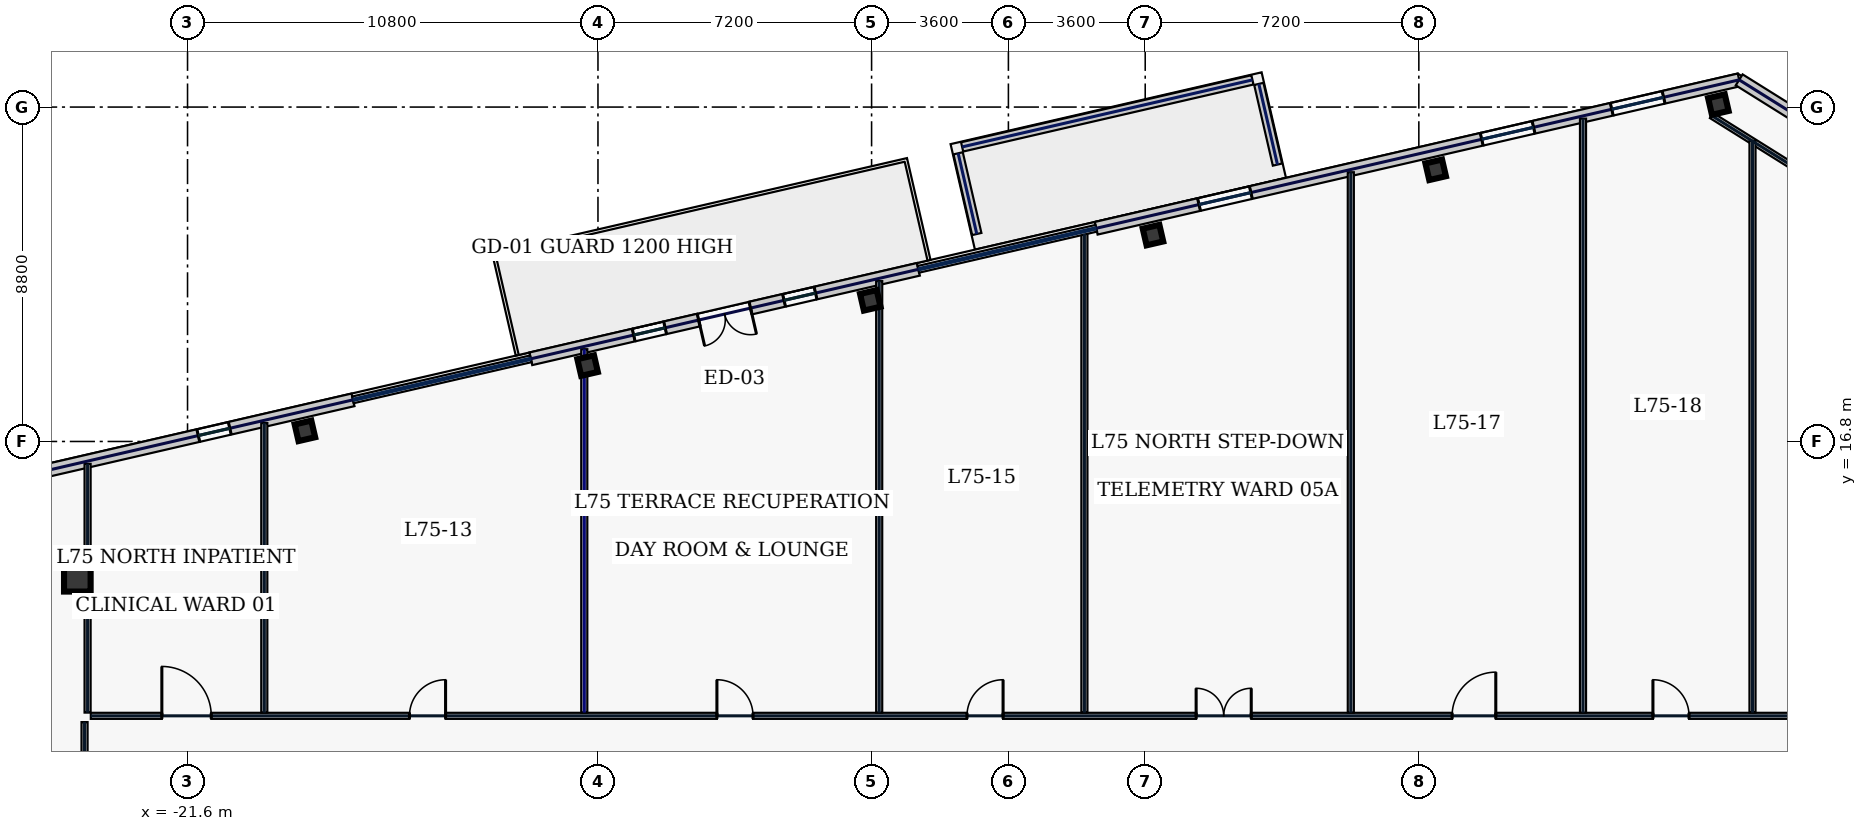
"""IFC4 building model, lengths in metres.
Left out: names, types, materials, properties, quantities, classifications, styles, units other than length and angle.
Written with IfcOpenShell. Run it as: python <this file> out.ifc"""

import sys

from ifc_helpers import new_model, si_unit, direction, frame, frame_2d, origin, origin_2d, place, context, subcontext, project, spatial, rectangle, hollow_rectangle, extrude, element, fill, save


model = new_model("IFC4")
c1 = context("Model", 3, precision=1e-05, world=origin(), true_north=direction((0.0, 1.0)))
c2 = subcontext(c1, "Body", "Model", "MODEL_VIEW")
j1 = project(units=[si_unit("LENGTHUNIT", "METRE"), si_unit("PLANEANGLEUNIT", "RADIAN")], contexts=[c1])
p1 = place(None, origin())
s1 = spatial("IfcSite", under=j1, at=p1, CompositionType="ELEMENT")
p2 = place(p1, origin())
s2 = spatial("IfcBuilding", under=s1, at=p2, CompositionType="ELEMENT")
p3 = place(p2, frame((0.0, 0.0, 321.0)))
s3 = spatial("IfcBuildingStorey", under=s2, at=p3, CompositionType="ELEMENT", Elevation=321.0)
p4 = place(p3, frame((-24.5, 13.2, 0.0), z_axis=(0.0, 0.0, 1.0), x_axis=(1.0, 0.0, 0.0)))
e1 = element("IfcColumn", 1, at=p4, inside=s3, PredefinedType="COLUMN", context=c2, shape_type="SweptSolid", body=[
    extrude(hollow_rectangle(XDim=0.7, YDim=0.7, WallThickness=0.032, at=origin_2d()), origin(), (0.0, 0.0, 1.0), 3.74),
])
for number, where, z_axis, x_axis in (
    (2, (18.682, 25.666, 0.0), (0.0, 0.0, 1.0), (0.974, 0.225, 0.0)),
    (3, (11.243, 23.949, 0.0), (0.0, 0.0, 1.0), (0.974, 0.225, 0.0)),
    (4, (3.804, 22.232, 0.0), (0.0, 0.0, 1.0), (0.974, 0.225, 0.0)),
    (5, (-3.634, 20.514, 0.0), (0.0, 0.0, 1.0), (0.974, 0.225, 0.0)),
    (6, (-11.073, 18.797, 0.0), (0.0, 0.0, 1.0), (0.974, 0.225, 0.0)),
    (7, (-18.511, 17.08, 0.0), (0.0, 0.0, 1.0), (0.974, 0.225, 0.0)),
):
    element("IfcColumn", number, at=place(p3, frame(where, z_axis=z_axis, x_axis=x_axis)), inside=s3, PredefinedType="COLUMN", context=c2, shape_type="SweptSolid", body=[
        extrude(hollow_rectangle(XDim=0.45, YDim=0.45, WallThickness=0.022, at=origin_2d()), origin(), (0.0, 0.0, 1.0), 3.74),
    ])
p5 = place(p3, frame((-0.832, 22.26, 0.0), z_axis=(0.0, 0.0, 1.0), x_axis=(-0.224998554752, 0.974359097232, 0.0)))
e8 = element("IfcWall", 8, at=p5, inside=s3, PredefinedType="PARAPET", context=c2, shape_type="SweptSolid", body=[
    extrude(rectangle(XDim=2.18, YDim=0.25, at=frame_2d((1.09, 0.0))), origin(), (0.0, 0.0, 1.0), 1.15),
])
p6 = place(p3, frame((-1.218, 24.552, 0.0), z_axis=(0.0, 0.0, 1.0), x_axis=(0.974375973266, 0.224925460368, 0.0)))
e9 = element("IfcWall", 9, at=p6, inside=s3, PredefinedType="PARAPET", context=c2, shape_type="SweptSolid", body=[
    extrude(rectangle(XDim=7.84, YDim=0.25, at=frame_2d((3.92, 0.0))), origin(), (0.0, 0.0, 1.0), 1.15),
])
p7 = place(p3, frame((6.59, 26.21, 0.0), z_axis=(0.0, 0.0, 1.0), x_axis=(0.224867685436, -0.974389308258, 0.0)))
e10 = element("IfcWall", 10, at=p7, inside=s3, PredefinedType="PARAPET", context=c2, shape_type="SweptSolid", body=[
    extrude(rectangle(XDim=2.18, YDim=0.25, at=frame_2d((1.09, 0.0))), origin(), (0.0, 0.0, 1.0), 1.15),
])
p8 = place(p3, frame((19.229, 26.316, 0.0), z_axis=(0.0, 0.0, 1.0), x_axis=(-0.974372473594, -0.224940620392, 0.0)))
e11 = element("IfcWall", 11, at=p8, inside=s3, PredefinedType="STANDARD", context=c2, shape_type="SweptSolid", body=[
    extrude(rectangle(XDim=17.366, YDim=0.34, at=frame_2d((8.683, 0.0))), origin(), (0.0, 0.0, 1.0), 3.74),
])
p9 = place(p8, frame((13.187, 0.0, 1.0)))
e12 = element("IfcOpeningElement", 12, at=p9, cuts=e11, PredefinedType="OPENING", context=c2, shape_type="SweptSolid", body=[
    extrude(rectangle(XDim=1.4, YDim=1.85, at=frame_2d((0.7, 0.925))), frame((0.0, 0.18, 0.0), z_axis=(0.0, -1.0, 0.0), x_axis=(1.0, 0.0, 0.0)), (0.0, 0.0, 1.0), 0.36),
])
p10 = place(p8, frame((5.553, 0.0, 1.0)))
e13 = element("IfcOpeningElement", 13, at=p10, cuts=e11, PredefinedType="OPENING", context=c2, shape_type="SweptSolid", body=[
    extrude(rectangle(XDim=1.4, YDim=1.85, at=frame_2d((0.7, 0.925))), frame((0.0, 0.18, 0.0), z_axis=(0.0, -1.0, 0.0), x_axis=(1.0, 0.0, 0.0)), (0.0, 0.0, 1.0), 0.36),
])
p11 = place(p8, frame((2.041, 0.0, 1.0)))
e14 = element("IfcOpeningElement", 14, at=p11, cuts=e11, PredefinedType="OPENING", context=c2, shape_type="SweptSolid", body=[
    extrude(rectangle(XDim=1.4, YDim=1.85, at=frame_2d((0.7, 0.925))), frame((0.0, 0.18, 0.0), z_axis=(0.0, -1.0, 0.0), x_axis=(1.0, 0.0, 0.0)), (0.0, 0.0, 1.0), 0.36),
])
p12 = place(p3, frame((-2.368, 21.33, 0.0), z_axis=(0.0, 0.0, 1.0), x_axis=(-0.974367213107, -0.224963405961, 0.0)))
e15 = element("IfcWall", 15, at=p12, inside=s3, PredefinedType="STANDARD", context=c2, shape_type="SweptSolid", body=[
    extrude(rectangle(XDim=10.468, YDim=0.34, at=frame_2d((5.234, 0.0))), origin(), (0.0, 0.0, 1.0), 3.74),
])
p13 = place(p12, frame((4.534, 0.0, 0.0)))
e16 = element("IfcOpeningElement", 16, at=p13, cuts=e15, PredefinedType="OPENING", context=c2, shape_type="SweptSolid", body=[
    extrude(rectangle(XDim=1.4, YDim=2.2, at=frame_2d((0.7, 1.1))), frame((0.0, 0.18, 0.0), z_axis=(0.0, -1.0, 0.0), x_axis=(1.0, 0.0, 0.0)), (0.0, 0.0, 1.0), 0.36),
])
p14 = place(p12, frame((6.84, 0.0, 1.0)))
e17 = element("IfcOpeningElement", 17, at=p14, cuts=e15, PredefinedType="OPENING", context=c2, shape_type="SweptSolid", body=[
    extrude(rectangle(XDim=0.85, YDim=1.85, at=frame_2d((0.425, 0.925))), frame((0.0, 0.18, 0.0), z_axis=(0.0, -1.0, 0.0), x_axis=(1.0, 0.0, 0.0)), (0.0, 0.0, 1.0), 0.36),
])
p15 = place(p12, frame((2.778, 0.0, 1.0)))
e18 = element("IfcOpeningElement", 18, at=p15, cuts=e15, PredefinedType="OPENING", context=c2, shape_type="SweptSolid", body=[
    extrude(rectangle(XDim=0.85, YDim=1.85, at=frame_2d((0.425, 0.925))), frame((0.0, 0.18, 0.0), z_axis=(0.0, -1.0, 0.0), x_axis=(1.0, 0.0, 0.0)), (0.0, 0.0, 1.0), 0.36),
])
p16 = place(p3, frame((-17.245, 17.895, 0.0), z_axis=(0.0, 0.0, 1.0), x_axis=(-0.97437318493, -0.224937539085, 0.0)))
e19 = element("IfcWall", 19, at=p16, inside=s3, PredefinedType="STANDARD", context=c2, shape_type="SweptSolid", body=[
    extrude(rectangle(XDim=17.366, YDim=0.34, at=frame_2d((8.683, 0.0))), origin(), (0.0, 0.0, 1.0), 3.74),
])
p17 = place(p16, frame((13.925, 0.0, 1.0)))
e20 = element("IfcOpeningElement", 20, at=p17, cuts=e19, PredefinedType="OPENING", context=c2, shape_type="SweptSolid", body=[
    extrude(rectangle(XDim=1.4, YDim=1.85, at=frame_2d((0.7, 0.925))), frame((0.0, 0.18, 0.0), z_axis=(0.0, -1.0, 0.0), x_axis=(1.0, 0.0, 0.0)), (0.0, 0.0, 1.0), 0.36),
])
p18 = place(p16, frame((10.413, 0.0, 1.0)))
e21 = element("IfcOpeningElement", 21, at=p18, cuts=e19, PredefinedType="OPENING", context=c2, shape_type="SweptSolid", body=[
    extrude(rectangle(XDim=1.4, YDim=1.85, at=frame_2d((0.7, 0.925))), frame((0.0, 0.18, 0.0), z_axis=(0.0, -1.0, 0.0), x_axis=(1.0, 0.0, 0.0)), (0.0, 0.0, 1.0), 0.36),
])
p19 = place(p16, frame((3.329, 0.0, 1.0)))
e22 = element("IfcOpeningElement", 22, at=p19, cuts=e19, PredefinedType="OPENING", context=c2, shape_type="SweptSolid", body=[
    extrude(rectangle(XDim=0.85, YDim=1.85, at=frame_2d((0.425, 0.925))), frame((0.0, 0.18, 0.0), z_axis=(0.0, -1.0, 0.0), x_axis=(1.0, 0.0, 0.0)), (0.0, 0.0, 1.0), 0.36),
])
p20 = place(p3, frame((24.542, 22.996, 0.0), z_axis=(0.0, 0.0, 1.0), x_axis=(-0.848055220921, 0.529907862057, 0.0)))
e23 = element("IfcWall", 23, at=p20, inside=s3, PredefinedType="STANDARD", context=c2, shape_type="SweptSolid", body=[
    extrude(rectangle(XDim=6.265, YDim=0.34, at=frame_2d((3.132, 0.0))), origin(), (0.0, 0.0, 1.0), 3.74),
])
p21 = place(p3, frame((24.018, 21.931, 0.0), z_axis=(0.0, 0.0, 1.0), x_axis=(-0.848051009591, 0.529914601736, 0.0)))
e24 = element("IfcWall", 24, at=p21, inside=s3, PredefinedType="PARTITIONING", context=c2, shape_type="SweptSolid", body=[
    extrude(rectangle(XDim=6.505, YDim=0.16, at=frame_2d((3.253, 0.0))), origin(), (0.0, 0.0, 1.0), 3.74),
])
p22 = place(p3, frame((-24.31, -9.215, 0.0), z_axis=(0.0, 0.0, 1.0), x_axis=(0.0, 1.0, 0.0)))
e25 = element("IfcWall", 25, at=p22, inside=s3, PredefinedType="PARTITIONING", context=c2, shape_type="SweptSolid", body=[
    extrude(rectangle(XDim=18.63, YDim=0.16, at=frame_2d((9.315, 0.0))), origin(), (0.0, 0.0, 1.0), 3.74),
])
p23 = place(p22, frame((1.769, 0.0, 0.0)))
e26 = element("IfcOpeningElement", 26, at=p23, cuts=e25, PredefinedType="OPENING", context=c2, shape_type="SweptSolid", body=[
    extrude(rectangle(XDim=0.95, YDim=2.2, at=frame_2d((0.475, 1.1))), frame((0.0, 0.09, 0.0), z_axis=(0.0, -1.0, 0.0), x_axis=(1.0, 0.0, 0.0)), (0.0, 0.0, 1.0), 0.18),
])
p24 = place(p22, frame((5.6, 0.0, 0.0)))
e27 = element("IfcOpeningElement", 27, at=p24, cuts=e25, PredefinedType="OPENING", context=c2, shape_type="SweptSolid", body=[
    extrude(rectangle(XDim=0.95, YDim=2.2, at=frame_2d((0.475, 1.1))), frame((0.0, 0.09, 0.0), z_axis=(0.0, -1.0, 0.0), x_axis=(1.0, 0.0, 0.0)), (0.0, 0.0, 1.0), 0.18),
])
p25 = place(p22, frame((10.8, 0.0, 0.0)))
e28 = element("IfcOpeningElement", 28, at=p25, cuts=e25, PredefinedType="OPENING", context=c2, shape_type="SweptSolid", body=[
    extrude(rectangle(XDim=0.95, YDim=2.2, at=frame_2d((0.475, 1.1))), frame((0.0, 0.09, 0.0), z_axis=(0.0, -1.0, 0.0), x_axis=(1.0, 0.0, 0.0)), (0.0, 0.0, 1.0), 0.18),
])
p26 = place(p22, frame((15.981, 0.0, 0.0)))
e29 = element("IfcOpeningElement", 29, at=p26, cuts=e25, PredefinedType="OPENING", context=c2, shape_type="SweptSolid", body=[
    extrude(rectangle(XDim=0.95, YDim=2.2, at=frame_2d((0.475, 1.1))), frame((0.0, 0.09, 0.0), z_axis=(0.0, -1.0, 0.0), x_axis=(1.0, 0.0, 0.0)), (0.0, 0.0, 1.0), 0.18),
])
p27 = place(p3, frame((-24.145, 9.58, 0.0), z_axis=(0.0, 0.0, 1.0), x_axis=(1.0, 0.0, 0.0)))
e30 = element("IfcWall", 30, at=p27, inside=s3, PredefinedType="PARTITIONING", context=c2, shape_type="SweptSolid", body=[
    extrude(rectangle(XDim=48.29, YDim=0.16, at=frame_2d((24.145, 0.0))), origin(), (0.0, 0.0, 1.0), 3.74),
])
p28 = place(p27, frame((1.869, 0.0, 0.0)))
e31 = element("IfcOpeningElement", 31, at=p28, cuts=e30, PredefinedType="OPENING", context=c2, shape_type="SweptSolid", body=[
    extrude(rectangle(XDim=1.3, YDim=2.2, at=frame_2d((0.65, 1.1))), frame((0.0, 0.09, 0.0), z_axis=(0.0, -1.0, 0.0), x_axis=(1.0, 0.0, 0.0)), (0.0, 0.0, 1.0), 0.18),
])
p29 = place(p27, frame((8.385, 0.0, 0.0)))
e32 = element("IfcOpeningElement", 32, at=p29, cuts=e30, PredefinedType="OPENING", context=c2, shape_type="SweptSolid", body=[
    extrude(rectangle(XDim=0.95, YDim=2.2, at=frame_2d((0.475, 1.1))), frame((0.0, 0.09, 0.0), z_axis=(0.0, -1.0, 0.0), x_axis=(1.0, 0.0, 0.0)), (0.0, 0.0, 1.0), 0.18),
])
p30 = place(p27, frame((16.475, 0.0, 0.0)))
e33 = element("IfcOpeningElement", 33, at=p30, cuts=e30, PredefinedType="OPENING", context=c2, shape_type="SweptSolid", body=[
    extrude(rectangle(XDim=0.95, YDim=2.2, at=frame_2d((0.475, 1.1))), frame((0.0, 0.09, 0.0), z_axis=(0.0, -1.0, 0.0), x_axis=(1.0, 0.0, 0.0)), (0.0, 0.0, 1.0), 0.18),
])
p31 = place(p27, frame((23.055, 0.0, 0.0)))
e34 = element("IfcOpeningElement", 34, at=p31, cuts=e30, PredefinedType="OPENING", context=c2, shape_type="SweptSolid", body=[
    extrude(rectangle(XDim=0.95, YDim=2.2, at=frame_2d((0.475, 1.1))), frame((0.0, 0.09, 0.0), z_axis=(0.0, -1.0, 0.0), x_axis=(1.0, 0.0, 0.0)), (0.0, 0.0, 1.0), 0.18),
])
p32 = place(p27, frame((29.085, 0.0, 0.0)))
e35 = element("IfcOpeningElement", 35, at=p32, cuts=e30, PredefinedType="OPENING", context=c2, shape_type="SweptSolid", body=[
    extrude(rectangle(XDim=1.45, YDim=2.2, at=frame_2d((0.725, 1.1))), frame((0.0, 0.09, 0.0), z_axis=(0.0, -1.0, 0.0), x_axis=(1.0, 0.0, 0.0)), (0.0, 0.0, 1.0), 0.18),
])
p33 = place(p27, frame((35.82, 0.0, 0.0)))
e36 = element("IfcOpeningElement", 36, at=p33, cuts=e30, PredefinedType="OPENING", context=c2, shape_type="SweptSolid", body=[
    extrude(rectangle(XDim=1.15, YDim=2.2, at=frame_2d((0.575, 1.1))), frame((0.0, 0.09, 0.0), z_axis=(0.0, -1.0, 0.0), x_axis=(1.0, 0.0, 0.0)), (0.0, 0.0, 1.0), 0.18),
])
p34 = place(p27, frame((41.105, 0.0, 0.0)))
e37 = element("IfcOpeningElement", 37, at=p34, cuts=e30, PredefinedType="OPENING", context=c2, shape_type="SweptSolid", body=[
    extrude(rectangle(XDim=0.95, YDim=2.2, at=frame_2d((0.475, 1.1))), frame((0.0, 0.09, 0.0), z_axis=(0.0, -1.0, 0.0), x_axis=(1.0, 0.0, 0.0)), (0.0, 0.0, 1.0), 0.18),
])
p35 = place(p27, frame((45.466, 0.0, 0.0)))
e38 = element("IfcOpeningElement", 38, at=p35, cuts=e30, PredefinedType="OPENING", context=c2, shape_type="SweptSolid", body=[
    extrude(rectangle(XDim=0.95, YDim=2.2, at=frame_2d((0.475, 1.1))), frame((0.0, 0.09, 0.0), z_axis=(0.0, -1.0, 0.0), x_axis=(1.0, 0.0, 0.0)), (0.0, 0.0, 1.0), 0.18),
])
p36 = place(p3, frame((-24.23, 9.665, 0.0), z_axis=(0.0, 0.0, 1.0), x_axis=(0.0, 1.0, 0.0)))
e39 = element("IfcWall", 39, at=p36, inside=s3, PredefinedType="PARTITIONING", context=c2, shape_type="SweptSolid", body=[
    extrude(rectangle(XDim=6.546, YDim=0.16, at=frame_2d((3.273, 0.0))), origin(), (0.0, 0.0, 1.0), 3.74),
])
p37 = place(p3, frame((-19.58, 9.665, 0.0), z_axis=(0.0, 0.0, 1.0), x_axis=(0.0, 1.0, 0.0)))
e40 = element("IfcWall", 40, at=p37, inside=s3, PredefinedType="PARTITIONING", context=c2, shape_type="SweptSolid", body=[
    extrude(rectangle(XDim=7.619, YDim=0.16, at=frame_2d((3.81, 0.0))), origin(), (0.0, 0.0, 1.0), 3.74),
])
p38 = place(p3, frame((-11.16, 9.665, 0.0), z_axis=(0.0, 0.0, 1.0), x_axis=(0.0, 1.0, 0.0)))
e41 = element("IfcWall", 41, at=p38, inside=s3, PredefinedType="PARTITIONING", context=c2, shape_type="SweptSolid", body=[
    extrude(rectangle(XDim=9.563, YDim=0.16, at=frame_2d((4.782, 0.0))), origin(), (0.0, 0.0, 1.0), 3.335),
])
p39 = place(p3, frame((-3.4, 9.665, 0.0), z_axis=(0.0, 0.0, 1.0), x_axis=(0.0, 1.0, 0.0)))
e42 = element("IfcWall", 42, at=p39, inside=s3, PredefinedType="PARTITIONING", context=c2, shape_type="SweptSolid", body=[
    extrude(rectangle(XDim=11.355, YDim=0.16, at=frame_2d((5.677, 0.0))), origin(), (0.0, 0.0, 1.0), 3.74),
])
p40 = place(p3, frame((2.0, 9.665, 0.0), z_axis=(0.0, 0.0, 1.0), x_axis=(0.0, 1.0, 0.0)))
e43 = element("IfcWall", 43, at=p40, inside=s3, PredefinedType="PARTITIONING", context=c2, shape_type="SweptSolid", body=[
    extrude(rectangle(XDim=12.602, YDim=0.16, at=frame_2d((6.301, 0.0))), origin(), (0.0, 0.0, 1.0), 3.74),
])
p41 = place(p3, frame((15.12, 9.665, 0.0), z_axis=(0.0, 0.0, 1.0), x_axis=(0.0, 1.0, 0.0)))
e44 = element("IfcWall", 44, at=p41, inside=s3, PredefinedType="PARTITIONING", context=c2, shape_type="SweptSolid", body=[
    extrude(rectangle(XDim=15.631, YDim=0.16, at=frame_2d((7.815, 0.0))), origin(), (0.0, 0.0, 1.0), 3.74),
])
p42 = place(p3, frame((19.58, 9.665, 0.0), z_axis=(0.0, 0.0, 1.0), x_axis=(0.0, 1.0, 0.0)))
e45 = element("IfcWall", 45, at=p42, inside=s3, PredefinedType="PARTITIONING", context=c2, shape_type="SweptSolid", body=[
    extrude(rectangle(XDim=15.048, YDim=0.16, at=frame_2d((7.524, 0.0))), origin(), (0.0, 0.0, 1.0), 3.74),
])
p43 = place(p3, frame((9.01, 9.665, 0.0), z_axis=(0.0, 0.0, 1.0), x_axis=(0.0, 1.0, 0.0)))
e46 = element("IfcWall", 46, at=p43, inside=s3, PredefinedType="PARTITIONING", context=c2, shape_type="SweptSolid", body=[
    extrude(rectangle(XDim=14.22, YDim=0.16, at=frame_2d((7.11, 0.0))), origin(), (0.0, 0.0, 1.0), 3.74),
])
p44 = place(p9, origin())
e47 = element("IfcWindow", 47, at=p44, inside=s3, PartitioningType="SINGLE_PANEL", PredefinedType="WINDOW", context=c2, shape_type="SweptSolid", body=[
    extrude(rectangle(XDim=1.4, YDim=1.85, at=frame_2d((0.7, 0.925))), frame((0.0, 0.03, 0.0), z_axis=(0.0, -1.0, 0.0), x_axis=(1.0, 0.0, 0.0)), (0.0, 0.0, 1.0), 0.06),
])
fill(e12, e47)
p45 = place(p10, origin())
e48 = element("IfcWindow", 48, at=p45, inside=s3, PartitioningType="SINGLE_PANEL", PredefinedType="WINDOW", context=c2, shape_type="SweptSolid", body=[
    extrude(rectangle(XDim=1.4, YDim=1.85, at=frame_2d((0.7, 0.925))), frame((0.0, 0.03, 0.0), z_axis=(0.0, -1.0, 0.0), x_axis=(1.0, 0.0, 0.0)), (0.0, 0.0, 1.0), 0.06),
])
fill(e13, e48)
p46 = place(p11, origin())
e49 = element("IfcWindow", 49, at=p46, inside=s3, PartitioningType="SINGLE_PANEL", PredefinedType="WINDOW", context=c2, shape_type="SweptSolid", body=[
    extrude(rectangle(XDim=1.4, YDim=1.85, at=frame_2d((0.7, 0.925))), frame((0.0, 0.03, 0.0), z_axis=(0.0, -1.0, 0.0), x_axis=(1.0, 0.0, 0.0)), (0.0, 0.0, 1.0), 0.06),
])
fill(e14, e49)
p47 = place(p13, origin())
e50 = element("IfcDoor", 50, at=p47, inside=s3, OperationType="DOUBLE_SWING_LEFT", PredefinedType="DOOR", context=c2, shape_type="SweptSolid", body=[
    extrude(rectangle(XDim=1.4, YDim=2.2, at=frame_2d((0.7, 1.1))), frame((0.0, 0.025, 0.0), z_axis=(0.0, -1.0, 0.0), x_axis=(1.0, 0.0, 0.0)), (0.0, 0.0, 1.0), 0.05),
])
fill(e16, e50)
p48 = place(p14, origin())
e51 = element("IfcWindow", 51, at=p48, inside=s3, PartitioningType="SINGLE_PANEL", PredefinedType="WINDOW", context=c2, shape_type="SweptSolid", body=[
    extrude(rectangle(XDim=0.85, YDim=1.85, at=frame_2d((0.425, 0.925))), frame((0.0, 0.03, 0.0), z_axis=(0.0, -1.0, 0.0), x_axis=(1.0, 0.0, 0.0)), (0.0, 0.0, 1.0), 0.06),
])
fill(e17, e51)
p49 = place(p15, origin())
e52 = element("IfcWindow", 52, at=p49, inside=s3, PartitioningType="SINGLE_PANEL", PredefinedType="WINDOW", context=c2, shape_type="SweptSolid", body=[
    extrude(rectangle(XDim=0.85, YDim=1.85, at=frame_2d((0.425, 0.925))), frame((0.0, 0.03, 0.0), z_axis=(0.0, -1.0, 0.0), x_axis=(1.0, 0.0, 0.0)), (0.0, 0.0, 1.0), 0.06),
])
fill(e18, e52)
p50 = place(p19, origin())
e53 = element("IfcWindow", 53, at=p50, inside=s3, PartitioningType="SINGLE_PANEL", PredefinedType="WINDOW", context=c2, shape_type="SweptSolid", body=[
    extrude(rectangle(XDim=0.85, YDim=1.85, at=frame_2d((0.425, 0.925))), frame((0.0, 0.03, 0.0), z_axis=(0.0, -1.0, 0.0), x_axis=(1.0, 0.0, 0.0)), (0.0, 0.0, 1.0), 0.06),
])
fill(e22, e53)
p51 = place(p28, origin())
e54 = element("IfcDoor", 54, at=p51, inside=s3, OperationType="SINGLE_SWING_LEFT", PredefinedType="DOOR", context=c2, shape_type="SweptSolid", body=[
    extrude(rectangle(XDim=1.3, YDim=2.2, at=frame_2d((0.65, 1.1))), frame((0.0, 0.025, 0.0), z_axis=(0.0, -1.0, 0.0), x_axis=(1.0, 0.0, 0.0)), (0.0, 0.0, 1.0), 0.05),
])
fill(e31, e54)
p52 = place(p29, origin())
e55 = element("IfcDoor", 55, at=p52, inside=s3, OperationType="SINGLE_SWING_RIGHT", PredefinedType="DOOR", context=c2, shape_type="SweptSolid", body=[
    extrude(rectangle(XDim=0.95, YDim=2.2, at=frame_2d((0.475, 1.1))), frame((0.0, 0.025, 0.0), z_axis=(0.0, -1.0, 0.0), x_axis=(1.0, 0.0, 0.0)), (0.0, 0.0, 1.0), 0.05),
])
fill(e32, e55)
p53 = place(p30, origin())
e56 = element("IfcDoor", 56, at=p53, inside=s3, OperationType="SINGLE_SWING_LEFT", PredefinedType="DOOR", context=c2, shape_type="SweptSolid", body=[
    extrude(rectangle(XDim=0.95, YDim=2.2, at=frame_2d((0.475, 1.1))), frame((0.0, 0.025, 0.0), z_axis=(0.0, -1.0, 0.0), x_axis=(1.0, 0.0, 0.0)), (0.0, 0.0, 1.0), 0.05),
])
fill(e33, e56)
p54 = place(p31, origin())
e57 = element("IfcDoor", 57, at=p54, inside=s3, OperationType="SINGLE_SWING_RIGHT", PredefinedType="DOOR", context=c2, shape_type="SweptSolid", body=[
    extrude(rectangle(XDim=0.95, YDim=2.2, at=frame_2d((0.475, 1.1))), frame((0.0, 0.025, 0.0), z_axis=(0.0, -1.0, 0.0), x_axis=(1.0, 0.0, 0.0)), (0.0, 0.0, 1.0), 0.05),
])
fill(e34, e57)
p55 = place(p32, origin())
e58 = element("IfcDoor", 58, at=p55, inside=s3, OperationType="DOUBLE_SWING_LEFT", PredefinedType="DOOR", context=c2, shape_type="SweptSolid", body=[
    extrude(rectangle(XDim=1.45, YDim=2.2, at=frame_2d((0.725, 1.1))), frame((0.0, 0.025, 0.0), z_axis=(0.0, -1.0, 0.0), x_axis=(1.0, 0.0, 0.0)), (0.0, 0.0, 1.0), 0.05),
])
fill(e35, e58)
p56 = place(p33, origin())
e59 = element("IfcDoor", 59, at=p56, inside=s3, OperationType="SINGLE_SWING_RIGHT", PredefinedType="DOOR", context=c2, shape_type="SweptSolid", body=[
    extrude(rectangle(XDim=1.15, YDim=2.2, at=frame_2d((0.575, 1.1))), frame((0.0, 0.025, 0.0), z_axis=(0.0, -1.0, 0.0), x_axis=(1.0, 0.0, 0.0)), (0.0, 0.0, 1.0), 0.05),
])
fill(e36, e59)
p57 = place(p34, origin())
e60 = element("IfcDoor", 60, at=p57, inside=s3, OperationType="SINGLE_SWING_LEFT", PredefinedType="DOOR", context=c2, shape_type="SweptSolid", body=[
    extrude(rectangle(XDim=0.95, YDim=2.2, at=frame_2d((0.475, 1.1))), frame((0.0, 0.025, 0.0), z_axis=(0.0, -1.0, 0.0), x_axis=(1.0, 0.0, 0.0)), (0.0, 0.0, 1.0), 0.05),
])
fill(e37, e60)
save(model, sys.argv[1])
